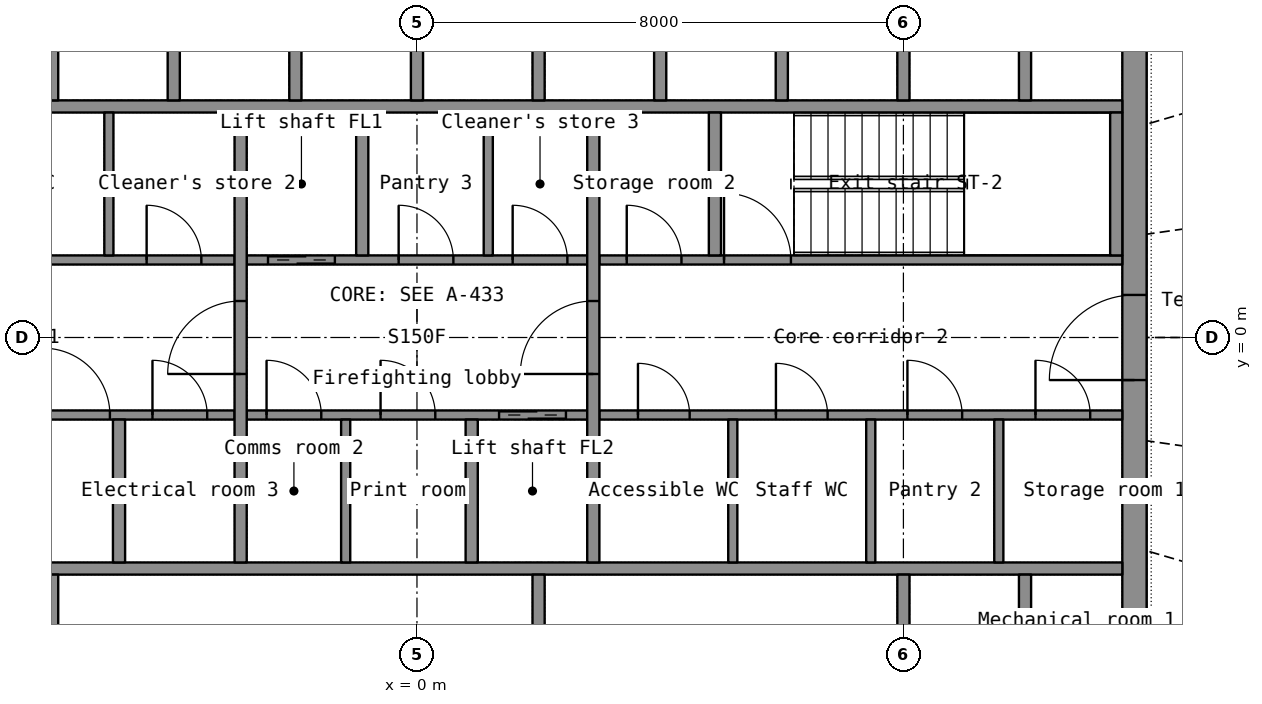
"""IFC4 building model, lengths in metres.
Left out: names, types, materials, properties, quantities, classifications, styles, units other than length and angle.
Written with IfcOpenShell. Run it as: python <this file> out.ifc"""

import sys

from ifc_helpers import new_model, si_unit, direction, frame, frame_2d, origin, place, context, subcontext, project, spatial, rectangle, extrude, element, fill, save


model = new_model("IFC4")
c1 = context("Model", 3, precision=1e-05, world=origin(), true_north=direction((0.0, 1.0)))
c2 = subcontext(c1, "Body", "Model", "MODEL_VIEW")
j1 = project(units=[si_unit("LENGTHUNIT", "METRE"), si_unit("PLANEANGLEUNIT", "RADIAN")], contexts=[c1])
p1 = place(None, origin())
s1 = spatial("IfcSite", under=j1, at=p1, CompositionType="ELEMENT")
p2 = place(p1, origin())
s2 = spatial("IfcBuilding", under=s1, at=p2, CompositionType="ELEMENT")
p3 = place(p2, frame((0.0, 0.0, 261.5)))
s3 = spatial("IfcBuildingStorey", under=s2, at=p3, CompositionType="ELEMENT", Elevation=261.5)
p4 = place(p3, frame((11.8, -7.2, 0.0), z_axis=(0.0, 0.0, 1.0), x_axis=(0.0, 1.0, 0.0)))
e1 = element("IfcWall", 1, at=p4, inside=s3, PredefinedType="SHEAR", context=c2, shape_type="SweptSolid", body=[
    extrude(rectangle(XDim=14.4, YDim=0.4, at=frame_2d((7.2, 0.0))), origin(), (0.0, 0.0, 1.0), 3.3),
])
p5 = place(p4, frame((6.5, 0.0, 0.0)))
e2 = element("IfcOpeningElement", 2, at=p5, cuts=e1, PredefinedType="OPENING", context=c2, shape_type="SweptSolid", body=[
    extrude(rectangle(XDim=1.4, YDim=2.2, at=frame_2d((0.7, 1.1))), frame((0.0, 0.21, 0.0), z_axis=(0.0, -1.0, 0.0), x_axis=(1.0, 0.0, 0.0)), (0.0, 0.0, 1.0), 0.42),
])
for number, where, z_axis, x_axis in (
    (3, (-11.6, -3.8, 0.0), (0.0, 0.0, 1.0), (1.0, 0.0, 0.0)),
    (4, (-11.6, 3.8, 0.0), (0.0, 0.0, 1.0), (1.0, 0.0, 0.0)),
):
    element("IfcWall", number, at=place(p3, frame(where, z_axis=z_axis, x_axis=x_axis)), inside=s3, PredefinedType="SHEAR", context=c2, shape_type="SweptSolid", body=[
        extrude(rectangle(XDim=23.2, YDim=0.2, at=frame_2d((11.6, 0.0))), origin(), (0.0, 0.0, 1.0), 3.3),
    ])
for number, where, z_axis, x_axis in (
    (5, (8.0, -6.8, 0.0), (0.0, 0.0, 1.0), (0.0, 1.0, 0.0)),
    (6, (10.0, -6.8, 0.0), (0.0, 0.0, 1.0), (0.0, 1.0, 0.0)),
):
    element("IfcWall", number, at=place(p3, frame(where, z_axis=z_axis, x_axis=x_axis)), inside=s3, PredefinedType="SHEAR", context=c2, shape_type="SweptSolid", body=[
        extrude(rectangle(XDim=2.9, YDim=0.2, at=frame_2d((1.45, 0.0))), origin(), (0.0, 0.0, 1.0), 3.3),
    ])
for number, where, z_axis, x_axis in (
    (7, (-6.0, -6.8, 0.0), (0.0, 0.0, 1.0), (0.0, 1.0, 0.0)),
    (8, (2.0, -6.8, 0.0), (0.0, 0.0, 1.0), (0.0, 1.0, 0.0)),
):
    element("IfcWall", number, at=place(p3, frame(where, z_axis=z_axis, x_axis=x_axis)), inside=s3, PredefinedType="PARTITIONING", context=c2, shape_type="SweptSolid", body=[
        extrude(rectangle(XDim=2.9, YDim=0.2, at=frame_2d((1.45, 0.0))), origin(), (0.0, 0.0, 1.0), 3.3),
    ])
for number, where, z_axis, x_axis in (
    (9, (-6.0, 3.9, 0.0), (0.0, 0.0, 1.0), (0.0, 1.0, 0.0)),
    (10, (-4.0, 3.9, 0.0), (0.0, 0.0, 1.0), (0.0, 1.0, 0.0)),
    (11, (-2.0, 3.9, 0.0), (0.0, 0.0, 1.0), (0.0, 1.0, 0.0)),
    (12, (0.0, 3.9, 0.0), (0.0, 0.0, 1.0), (0.0, 1.0, 0.0)),
    (13, (2.0, 3.9, 0.0), (0.0, 0.0, 1.0), (0.0, 1.0, 0.0)),
    (14, (4.0, 3.9, 0.0), (0.0, 0.0, 1.0), (0.0, 1.0, 0.0)),
    (15, (6.0, 3.9, 0.0), (0.0, 0.0, 1.0), (0.0, 1.0, 0.0)),
    (16, (8.0, 3.9, 0.0), (0.0, 0.0, 1.0), (0.0, 1.0, 0.0)),
    (17, (10.0, 3.9, 0.0), (0.0, 0.0, 1.0), (0.0, 1.0, 0.0)),
):
    element("IfcWall", number, at=place(p3, frame(where, z_axis=z_axis, x_axis=x_axis)), inside=s3, PredefinedType="SHEAR", context=c2, shape_type="SweptSolid", body=[
        extrude(rectangle(XDim=2.9, YDim=0.2, at=frame_2d((1.45, 0.0))), origin(), (0.0, 0.0, 1.0), 3.3),
    ])
p6 = place(p3, frame((-11.6, -1.275, 0.0), z_axis=(0.0, 0.0, 1.0), x_axis=(1.0, 0.0, 0.0)))
e18 = element("IfcWall", 18, at=p6, inside=s3, PredefinedType="SHEAR", context=c2, shape_type="SweptSolid", body=[
    extrude(rectangle(XDim=8.6, YDim=0.15, at=frame_2d((4.3, 0.0))), origin(), (0.0, 0.0, 1.0), 3.3),
])
p7 = place(p6, frame((5.45, 0.0, 0.0)))
e19 = element("IfcOpeningElement", 19, at=p7, cuts=e18, PredefinedType="OPENING", context=c2, shape_type="SweptSolid", body=[
    extrude(rectangle(XDim=1.1, YDim=2.15, at=frame_2d((0.55, 1.075))), frame((0.0, 0.085, 0.0), z_axis=(0.0, -1.0, 0.0), x_axis=(1.0, 0.0, 0.0)), (0.0, 0.0, 1.0), 0.17),
])
p8 = place(p6, frame((7.25, 0.0, 0.0)))
e20 = element("IfcOpeningElement", 20, at=p8, cuts=e18, PredefinedType="OPENING", context=c2, shape_type="SweptSolid", body=[
    extrude(rectangle(XDim=0.9, YDim=2.1, at=frame_2d((0.45, 1.05))), frame((0.0, 0.085, 0.0), z_axis=(0.0, -1.0, 0.0), x_axis=(1.0, 0.0, 0.0)), (0.0, 0.0, 1.0), 0.17),
])
p9 = place(p3, frame((-2.8, -1.275, 0.0), z_axis=(0.0, 0.0, 1.0), x_axis=(1.0, 0.0, 0.0)))
e21 = element("IfcWall", 21, at=p9, inside=s3, PredefinedType="SHEAR", context=c2, shape_type="SweptSolid", body=[
    extrude(rectangle(XDim=5.6, YDim=0.15, at=frame_2d((2.8, 0.0))), origin(), (0.0, 0.0, 1.0), 3.3),
])
p10 = place(p9, frame((4.15, 0.0, 0.0)))
e22 = element("IfcOpeningElement", 22, at=p10, cuts=e21, PredefinedType="OPENING", context=c2, shape_type="SweptSolid", body=[
    extrude(rectangle(XDim=1.1, YDim=2.2, at=frame_2d((0.55, 1.1))), frame((0.0, 0.085, 0.0), z_axis=(0.0, -1.0, 0.0), x_axis=(1.0, 0.0, 0.0)), (0.0, 0.0, 1.0), 0.17),
])
p11 = place(p9, frame((0.326, 0.0, 0.0)))
e23 = element("IfcOpeningElement", 23, at=p11, cuts=e21, PredefinedType="OPENING", context=c2, shape_type="SweptSolid", body=[
    extrude(rectangle(XDim=0.9, YDim=2.1, at=frame_2d((0.45, 1.05))), frame((0.0, 0.085, 0.0), z_axis=(0.0, -1.0, 0.0), x_axis=(1.0, 0.0, 0.0)), (0.0, 0.0, 1.0), 0.17),
])
p12 = place(p9, frame((2.201, 0.0, 0.0)))
e24 = element("IfcOpeningElement", 24, at=p12, cuts=e21, PredefinedType="OPENING", context=c2, shape_type="SweptSolid", body=[
    extrude(rectangle(XDim=0.9, YDim=2.1, at=frame_2d((0.45, 1.05))), frame((0.0, 0.085, 0.0), z_axis=(0.0, -1.0, 0.0), x_axis=(1.0, 0.0, 0.0)), (0.0, 0.0, 1.0), 0.17),
])
p13 = place(p3, frame((3.0, -1.275, 0.0), z_axis=(0.0, 0.0, 1.0), x_axis=(1.0, 0.0, 0.0)))
e25 = element("IfcWall", 25, at=p13, inside=s3, PredefinedType="PARTITIONING", context=c2, shape_type="SweptSolid", body=[
    extrude(rectangle(XDim=8.6, YDim=0.15, at=frame_2d((4.3, 0.0))), origin(), (0.0, 0.0, 1.0), 3.3),
])
p14 = place(p13, frame((0.635, 0.0, 0.0)))
e26 = element("IfcOpeningElement", 26, at=p14, cuts=e25, PredefinedType="OPENING", context=c2, shape_type="SweptSolid", body=[
    extrude(rectangle(XDim=0.85, YDim=2.1, at=frame_2d((0.425, 1.05))), frame((0.0, 0.085, 0.0), z_axis=(0.0, -1.0, 0.0), x_axis=(1.0, 0.0, 0.0)), (0.0, 0.0, 1.0), 0.17),
])
p15 = place(p13, frame((2.904, 0.0, 0.0)))
e27 = element("IfcOpeningElement", 27, at=p15, cuts=e25, PredefinedType="OPENING", context=c2, shape_type="SweptSolid", body=[
    extrude(rectangle(XDim=0.85, YDim=2.1, at=frame_2d((0.425, 1.05))), frame((0.0, 0.085, 0.0), z_axis=(0.0, -1.0, 0.0), x_axis=(1.0, 0.0, 0.0)), (0.0, 0.0, 1.0), 0.17),
])
p16 = place(p13, frame((5.066, 0.0, 0.0)))
e28 = element("IfcOpeningElement", 28, at=p16, cuts=e25, PredefinedType="OPENING", context=c2, shape_type="SweptSolid", body=[
    extrude(rectangle(XDim=0.9, YDim=2.1, at=frame_2d((0.45, 1.05))), frame((0.0, 0.085, 0.0), z_axis=(0.0, -1.0, 0.0), x_axis=(1.0, 0.0, 0.0)), (0.0, 0.0, 1.0), 0.17),
])
p17 = place(p13, frame((7.172, 0.0, 0.0)))
e29 = element("IfcOpeningElement", 29, at=p17, cuts=e25, PredefinedType="OPENING", context=c2, shape_type="SweptSolid", body=[
    extrude(rectangle(XDim=0.9, YDim=2.1, at=frame_2d((0.45, 1.05))), frame((0.0, 0.085, 0.0), z_axis=(0.0, -1.0, 0.0), x_axis=(1.0, 0.0, 0.0)), (0.0, 0.0, 1.0), 0.17),
])
p18 = place(p3, frame((-11.6, 1.275, 0.0), z_axis=(0.0, 0.0, 1.0), x_axis=(1.0, 0.0, 0.0)))
e30 = element("IfcWall", 30, at=p18, inside=s3, PredefinedType="PARTITIONING", context=c2, shape_type="SweptSolid", body=[
    extrude(rectangle(XDim=8.6, YDim=0.15, at=frame_2d((4.3, 0.0))), origin(), (0.0, 0.0, 1.0), 3.3),
])
p19 = place(p18, frame((1.152, 0.0, 0.0)))
e31 = element("IfcOpeningElement", 31, at=p19, cuts=e30, PredefinedType="OPENING", context=c2, shape_type="SweptSolid", body=[
    extrude(rectangle(XDim=0.85, YDim=2.1, at=frame_2d((0.425, 1.05))), frame((0.0, 0.085, 0.0), z_axis=(0.0, -1.0, 0.0), x_axis=(1.0, 0.0, 0.0)), (0.0, 0.0, 1.0), 0.17),
])
p20 = place(p18, frame((4.456, 0.0, 0.0)))
e32 = element("IfcOpeningElement", 32, at=p20, cuts=e30, PredefinedType="OPENING", context=c2, shape_type="SweptSolid", body=[
    extrude(rectangle(XDim=0.85, YDim=2.1, at=frame_2d((0.425, 1.05))), frame((0.0, 0.085, 0.0), z_axis=(0.0, -1.0, 0.0), x_axis=(1.0, 0.0, 0.0)), (0.0, 0.0, 1.0), 0.17),
])
p21 = place(p18, frame((7.154, 0.0, 0.0)))
e33 = element("IfcOpeningElement", 33, at=p21, cuts=e30, PredefinedType="OPENING", context=c2, shape_type="SweptSolid", body=[
    extrude(rectangle(XDim=0.9, YDim=2.1, at=frame_2d((0.45, 1.05))), frame((0.0, 0.085, 0.0), z_axis=(0.0, -1.0, 0.0), x_axis=(1.0, 0.0, 0.0)), (0.0, 0.0, 1.0), 0.17),
])
p22 = place(p3, frame((-2.8, 1.275, 0.0), z_axis=(0.0, 0.0, 1.0), x_axis=(1.0, 0.0, 0.0)))
e34 = element("IfcWall", 34, at=p22, inside=s3, PredefinedType="SHEAR", context=c2, shape_type="SweptSolid", body=[
    extrude(rectangle(XDim=5.6, YDim=0.15, at=frame_2d((2.8, 0.0))), origin(), (0.0, 0.0, 1.0), 3.3),
])
p23 = place(p22, frame((0.35, 0.0, 0.0)))
e35 = element("IfcOpeningElement", 35, at=p23, cuts=e34, PredefinedType="OPENING", context=c2, shape_type="SweptSolid", body=[
    extrude(rectangle(XDim=1.1, YDim=2.2, at=frame_2d((0.55, 1.1))), frame((0.0, 0.085, 0.0), z_axis=(0.0, -1.0, 0.0), x_axis=(1.0, 0.0, 0.0)), (0.0, 0.0, 1.0), 0.17),
])
p24 = place(p22, frame((2.499, 0.0, 0.0)))
e36 = element("IfcOpeningElement", 36, at=p24, cuts=e34, PredefinedType="OPENING", context=c2, shape_type="SweptSolid", body=[
    extrude(rectangle(XDim=0.9, YDim=2.1, at=frame_2d((0.45, 1.05))), frame((0.0, 0.085, 0.0), z_axis=(0.0, -1.0, 0.0), x_axis=(1.0, 0.0, 0.0)), (0.0, 0.0, 1.0), 0.17),
])
p25 = place(p22, frame((4.374, 0.0, 0.0)))
e37 = element("IfcOpeningElement", 37, at=p25, cuts=e34, PredefinedType="OPENING", context=c2, shape_type="SweptSolid", body=[
    extrude(rectangle(XDim=0.9, YDim=2.1, at=frame_2d((0.45, 1.05))), frame((0.0, 0.085, 0.0), z_axis=(0.0, -1.0, 0.0), x_axis=(1.0, 0.0, 0.0)), (0.0, 0.0, 1.0), 0.17),
])
p26 = place(p3, frame((3.0, 1.275, 0.0), z_axis=(0.0, 0.0, 1.0), x_axis=(1.0, 0.0, 0.0)))
e38 = element("IfcWall", 38, at=p26, inside=s3, PredefinedType="SHEAR", context=c2, shape_type="SweptSolid", body=[
    extrude(rectangle(XDim=8.6, YDim=0.15, at=frame_2d((4.3, 0.0))), origin(), (0.0, 0.0, 1.0), 3.3),
])
p27 = place(p26, frame((2.05, 0.0, 0.0)))
e39 = element("IfcOpeningElement", 39, at=p27, cuts=e38, PredefinedType="OPENING", context=c2, shape_type="SweptSolid", body=[
    extrude(rectangle(XDim=1.1, YDim=2.15, at=frame_2d((0.55, 1.075))), frame((0.0, 0.085, 0.0), z_axis=(0.0, -1.0, 0.0), x_axis=(1.0, 0.0, 0.0)), (0.0, 0.0, 1.0), 0.17),
])
p28 = place(p26, frame((0.45, 0.0, 0.0)))
e40 = element("IfcOpeningElement", 40, at=p28, cuts=e38, PredefinedType="OPENING", context=c2, shape_type="SweptSolid", body=[
    extrude(rectangle(XDim=0.9, YDim=2.1, at=frame_2d((0.45, 1.05))), frame((0.0, 0.085, 0.0), z_axis=(0.0, -1.0, 0.0), x_axis=(1.0, 0.0, 0.0)), (0.0, 0.0, 1.0), 0.17),
])
p29 = place(p3, frame((-2.9, -3.7, 0.0), z_axis=(0.0, 0.0, 1.0), x_axis=(0.0, 1.0, 0.0)))
e41 = element("IfcWall", 41, at=p29, inside=s3, PredefinedType="SHEAR", context=c2, shape_type="SweptSolid", body=[
    extrude(rectangle(XDim=7.4, YDim=0.2, at=frame_2d((3.7, 0.0))), origin(), (0.0, 0.0, 1.0), 3.3),
])
p30 = place(p29, frame((3.1, 0.0, 0.0)))
e42 = element("IfcOpeningElement", 42, at=p30, cuts=e41, PredefinedType="OPENING", context=c2, shape_type="SweptSolid", body=[
    extrude(rectangle(XDim=1.2, YDim=2.2, at=frame_2d((0.6, 1.1))), frame((0.0, 0.11, 0.0), z_axis=(0.0, -1.0, 0.0), x_axis=(1.0, 0.0, 0.0)), (0.0, 0.0, 1.0), 0.22),
])
p31 = place(p3, frame((2.9, -3.7, 0.0), z_axis=(0.0, 0.0, 1.0), x_axis=(0.0, 1.0, 0.0)))
e43 = element("IfcWall", 43, at=p31, inside=s3, PredefinedType="SHEAR", context=c2, shape_type="SweptSolid", body=[
    extrude(rectangle(XDim=7.4, YDim=0.2, at=frame_2d((3.7, 0.0))), origin(), (0.0, 0.0, 1.0), 3.3),
])
p32 = place(p31, frame((3.1, 0.0, 0.0)))
e44 = element("IfcOpeningElement", 44, at=p32, cuts=e43, PredefinedType="OPENING", context=c2, shape_type="SweptSolid", body=[
    extrude(rectangle(XDim=1.2, YDim=2.2, at=frame_2d((0.6, 1.1))), frame((0.0, 0.11, 0.0), z_axis=(0.0, -1.0, 0.0), x_axis=(1.0, 0.0, 0.0)), (0.0, 0.0, 1.0), 0.22),
])
for number, where, z_axis, x_axis in (
    (45, (-0.9, 1.35, 0.0), (0.0, 0.0, 1.0), (0.0, 1.0, 0.0)),
    (46, (0.9, -3.7, 0.0), (0.0, 0.0, 1.0), (0.0, 1.0, 0.0)),
    (47, (11.5, 1.35, 0.0), (0.0, 0.0, 1.0), (0.0, 1.0, 0.0)),
    (48, (-4.9, -3.7, 0.0), (0.0, 0.0, 1.0), (0.0, 1.0, 0.0)),
    (49, (4.9, 1.35, 0.0), (0.0, 0.0, 1.0), (0.0, 1.0, 0.0)),
):
    element("IfcWall", number, at=place(p3, frame(where, z_axis=z_axis, x_axis=x_axis)), inside=s3, PredefinedType="SHEAR", context=c2, shape_type="SweptSolid", body=[
        extrude(rectangle(XDim=2.35, YDim=0.2, at=frame_2d((1.175, 0.0))), origin(), (0.0, 0.0, 1.0), 3.3),
    ])
for number, where, z_axis, x_axis in (
    (50, (-5.067, 1.35, 0.0), (0.0, 0.0, 1.0), (0.0, 1.0, 0.0)),
    (51, (5.194, -3.7, 0.0), (0.0, 0.0, 1.0), (0.0, 1.0, 0.0)),
    (52, (7.463, -3.7, 0.0), (0.0, 0.0, 1.0), (0.0, 1.0, 0.0)),
    (53, (9.569, -3.7, 0.0), (0.0, 0.0, 1.0), (0.0, 1.0, 0.0)),
    (54, (1.173, 1.35, 0.0), (0.0, 0.0, 1.0), (0.0, 1.0, 0.0)),
    (55, (-1.173, -3.7, 0.0), (0.0, 0.0, 1.0), (0.0, 1.0, 0.0)),
):
    element("IfcWall", number, at=place(p3, frame(where, z_axis=z_axis, x_axis=x_axis)), inside=s3, PredefinedType="PARTITIONING", context=c2, shape_type="SweptSolid", body=[
        extrude(rectangle(XDim=2.35, YDim=0.15, at=frame_2d((1.175, 0.0))), origin(), (0.0, 0.0, 1.0), 3.3),
    ])
p33 = place(p5, origin())
e56 = element("IfcDoor", 56, at=p33, inside=s3, OperationType="DOUBLE_DOOR_SINGLE_SWING", PredefinedType="DOOR", context=c2, shape_type="SweptSolid", body=[
    extrude(rectangle(XDim=1.4, YDim=2.2, at=frame_2d((0.7, 1.1))), frame((0.0, 0.025, 0.0), z_axis=(0.0, -1.0, 0.0), x_axis=(1.0, 0.0, 0.0)), (0.0, 0.0, 1.0), 0.05),
])
fill(e2, e56)
p34 = place(p30, origin())
e57 = element("IfcDoor", 57, at=p34, inside=s3, OperationType="SINGLE_SWING_LEFT", PredefinedType="DOOR", context=c2, shape_type="SweptSolid", body=[
    extrude(rectangle(XDim=1.2, YDim=2.2, at=frame_2d((0.6, 1.1))), frame((0.0, 0.025, 0.0), z_axis=(0.0, -1.0, 0.0), x_axis=(1.0, 0.0, 0.0)), (0.0, 0.0, 1.0), 0.05),
])
fill(e42, e57)
p35 = place(p32, origin())
e58 = element("IfcDoor", 58, at=p35, inside=s3, OperationType="SINGLE_SWING_LEFT", PredefinedType="DOOR", context=c2, shape_type="SweptSolid", body=[
    extrude(rectangle(XDim=1.2, YDim=2.2, at=frame_2d((0.6, 1.1))), frame((0.0, 0.025, 0.0), z_axis=(0.0, -1.0, 0.0), x_axis=(1.0, 0.0, 0.0)), (0.0, 0.0, 1.0), 0.05),
])
fill(e44, e58)
p36 = place(p23, origin())
e59 = element("IfcDoor", 59, at=p36, inside=s3, OperationType="DOUBLE_DOOR_SLIDING", PredefinedType="DOOR", context=c2, shape_type="SweptSolid", body=[
    extrude(rectangle(XDim=1.1, YDim=2.2, at=frame_2d((0.55, 1.1))), frame((0.0, 0.025, 0.0), z_axis=(0.0, -1.0, 0.0), x_axis=(1.0, 0.0, 0.0)), (0.0, 0.0, 1.0), 0.05),
])
fill(e35, e59)
p37 = place(p10, origin())
e60 = element("IfcDoor", 60, at=p37, inside=s3, OperationType="DOUBLE_DOOR_SLIDING", PredefinedType="DOOR", context=c2, shape_type="SweptSolid", body=[
    extrude(rectangle(XDim=1.1, YDim=2.2, at=frame_2d((0.55, 1.1))), frame((0.0, 0.025, 0.0), z_axis=(0.0, -1.0, 0.0), x_axis=(1.0, 0.0, 0.0)), (0.0, 0.0, 1.0), 0.05),
])
fill(e22, e60)
p38 = place(p7, origin())
e61 = element("IfcDoor", 61, at=p38, inside=s3, OperationType="SINGLE_SWING_LEFT", PredefinedType="DOOR", context=c2, shape_type="SweptSolid", body=[
    extrude(rectangle(XDim=1.1, YDim=2.15, at=frame_2d((0.55, 1.075))), frame((0.0, 0.025, 0.0), z_axis=(0.0, -1.0, 0.0), x_axis=(1.0, 0.0, 0.0)), (0.0, 0.0, 1.0), 0.05),
])
fill(e19, e61)
p39 = place(p27, origin())
e62 = element("IfcDoor", 62, at=p39, inside=s3, OperationType="SINGLE_SWING_LEFT", PredefinedType="DOOR", context=c2, shape_type="SweptSolid", body=[
    extrude(rectangle(XDim=1.1, YDim=2.15, at=frame_2d((0.55, 1.075))), frame((0.0, 0.025, 0.0), z_axis=(0.0, -1.0, 0.0), x_axis=(1.0, 0.0, 0.0)), (0.0, 0.0, 1.0), 0.05),
])
fill(e39, e62)
p40 = place(p21, origin())
e63 = element("IfcDoor", 63, at=p40, inside=s3, OperationType="SINGLE_SWING_LEFT", PredefinedType="DOOR", context=c2, shape_type="SweptSolid", body=[
    extrude(rectangle(XDim=0.9, YDim=2.1, at=frame_2d((0.45, 1.05))), frame((0.0, 0.025, 0.0), z_axis=(0.0, -1.0, 0.0), x_axis=(1.0, 0.0, 0.0)), (0.0, 0.0, 1.0), 0.05),
])
fill(e33, e63)
p41 = place(p14, origin())
e64 = element("IfcDoor", 64, at=p41, inside=s3, OperationType="SINGLE_SWING_LEFT", PredefinedType="DOOR", context=c2, shape_type="SweptSolid", body=[
    extrude(rectangle(XDim=0.85, YDim=2.1, at=frame_2d((0.425, 1.05))), frame((0.0, 0.025, 0.0), z_axis=(0.0, -1.0, 0.0), x_axis=(1.0, 0.0, 0.0)), (0.0, 0.0, 1.0), 0.05),
])
fill(e26, e64)
p42 = place(p15, origin())
e65 = element("IfcDoor", 65, at=p42, inside=s3, OperationType="SINGLE_SWING_LEFT", PredefinedType="DOOR", context=c2, shape_type="SweptSolid", body=[
    extrude(rectangle(XDim=0.85, YDim=2.1, at=frame_2d((0.425, 1.05))), frame((0.0, 0.025, 0.0), z_axis=(0.0, -1.0, 0.0), x_axis=(1.0, 0.0, 0.0)), (0.0, 0.0, 1.0), 0.05),
])
fill(e27, e65)
p43 = place(p16, origin())
e66 = element("IfcDoor", 66, at=p43, inside=s3, OperationType="SINGLE_SWING_LEFT", PredefinedType="DOOR", context=c2, shape_type="SweptSolid", body=[
    extrude(rectangle(XDim=0.9, YDim=2.1, at=frame_2d((0.45, 1.05))), frame((0.0, 0.025, 0.0), z_axis=(0.0, -1.0, 0.0), x_axis=(1.0, 0.0, 0.0)), (0.0, 0.0, 1.0), 0.05),
])
fill(e28, e66)
p44 = place(p17, origin())
e67 = element("IfcDoor", 67, at=p44, inside=s3, OperationType="SINGLE_SWING_LEFT", PredefinedType="DOOR", context=c2, shape_type="SweptSolid", body=[
    extrude(rectangle(XDim=0.9, YDim=2.1, at=frame_2d((0.45, 1.05))), frame((0.0, 0.025, 0.0), z_axis=(0.0, -1.0, 0.0), x_axis=(1.0, 0.0, 0.0)), (0.0, 0.0, 1.0), 0.05),
])
fill(e29, e67)
p45 = place(p24, origin())
e68 = element("IfcDoor", 68, at=p45, inside=s3, OperationType="SINGLE_SWING_LEFT", PredefinedType="DOOR", context=c2, shape_type="SweptSolid", body=[
    extrude(rectangle(XDim=0.9, YDim=2.1, at=frame_2d((0.45, 1.05))), frame((0.0, 0.025, 0.0), z_axis=(0.0, -1.0, 0.0), x_axis=(1.0, 0.0, 0.0)), (0.0, 0.0, 1.0), 0.05),
])
fill(e36, e68)
p46 = place(p25, origin())
e69 = element("IfcDoor", 69, at=p46, inside=s3, OperationType="SINGLE_SWING_LEFT", PredefinedType="DOOR", context=c2, shape_type="SweptSolid", body=[
    extrude(rectangle(XDim=0.9, YDim=2.1, at=frame_2d((0.45, 1.05))), frame((0.0, 0.025, 0.0), z_axis=(0.0, -1.0, 0.0), x_axis=(1.0, 0.0, 0.0)), (0.0, 0.0, 1.0), 0.05),
])
fill(e37, e69)
p47 = place(p11, origin())
e70 = element("IfcDoor", 70, at=p47, inside=s3, OperationType="SINGLE_SWING_LEFT", PredefinedType="DOOR", context=c2, shape_type="SweptSolid", body=[
    extrude(rectangle(XDim=0.9, YDim=2.1, at=frame_2d((0.45, 1.05))), frame((0.0, 0.025, 0.0), z_axis=(0.0, -1.0, 0.0), x_axis=(1.0, 0.0, 0.0)), (0.0, 0.0, 1.0), 0.05),
])
fill(e23, e70)
p48 = place(p12, origin())
e71 = element("IfcDoor", 71, at=p48, inside=s3, OperationType="SINGLE_SWING_LEFT", PredefinedType="DOOR", context=c2, shape_type="SweptSolid", body=[
    extrude(rectangle(XDim=0.9, YDim=2.1, at=frame_2d((0.45, 1.05))), frame((0.0, 0.025, 0.0), z_axis=(0.0, -1.0, 0.0), x_axis=(1.0, 0.0, 0.0)), (0.0, 0.0, 1.0), 0.05),
])
fill(e24, e71)
p49 = place(p28, origin())
e72 = element("IfcDoor", 72, at=p49, inside=s3, OperationType="SINGLE_SWING_LEFT", PredefinedType="DOOR", context=c2, shape_type="SweptSolid", body=[
    extrude(rectangle(XDim=0.9, YDim=2.1, at=frame_2d((0.45, 1.05))), frame((0.0, 0.025, 0.0), z_axis=(0.0, -1.0, 0.0), x_axis=(1.0, 0.0, 0.0)), (0.0, 0.0, 1.0), 0.05),
])
fill(e40, e72)
p50 = place(p8, origin())
e73 = element("IfcDoor", 73, at=p50, inside=s3, OperationType="SINGLE_SWING_LEFT", PredefinedType="DOOR", context=c2, shape_type="SweptSolid", body=[
    extrude(rectangle(XDim=0.9, YDim=2.1, at=frame_2d((0.45, 1.05))), frame((0.0, 0.025, 0.0), z_axis=(0.0, -1.0, 0.0), x_axis=(1.0, 0.0, 0.0)), (0.0, 0.0, 1.0), 0.05),
])
fill(e20, e73)
save(model, sys.argv[1])
